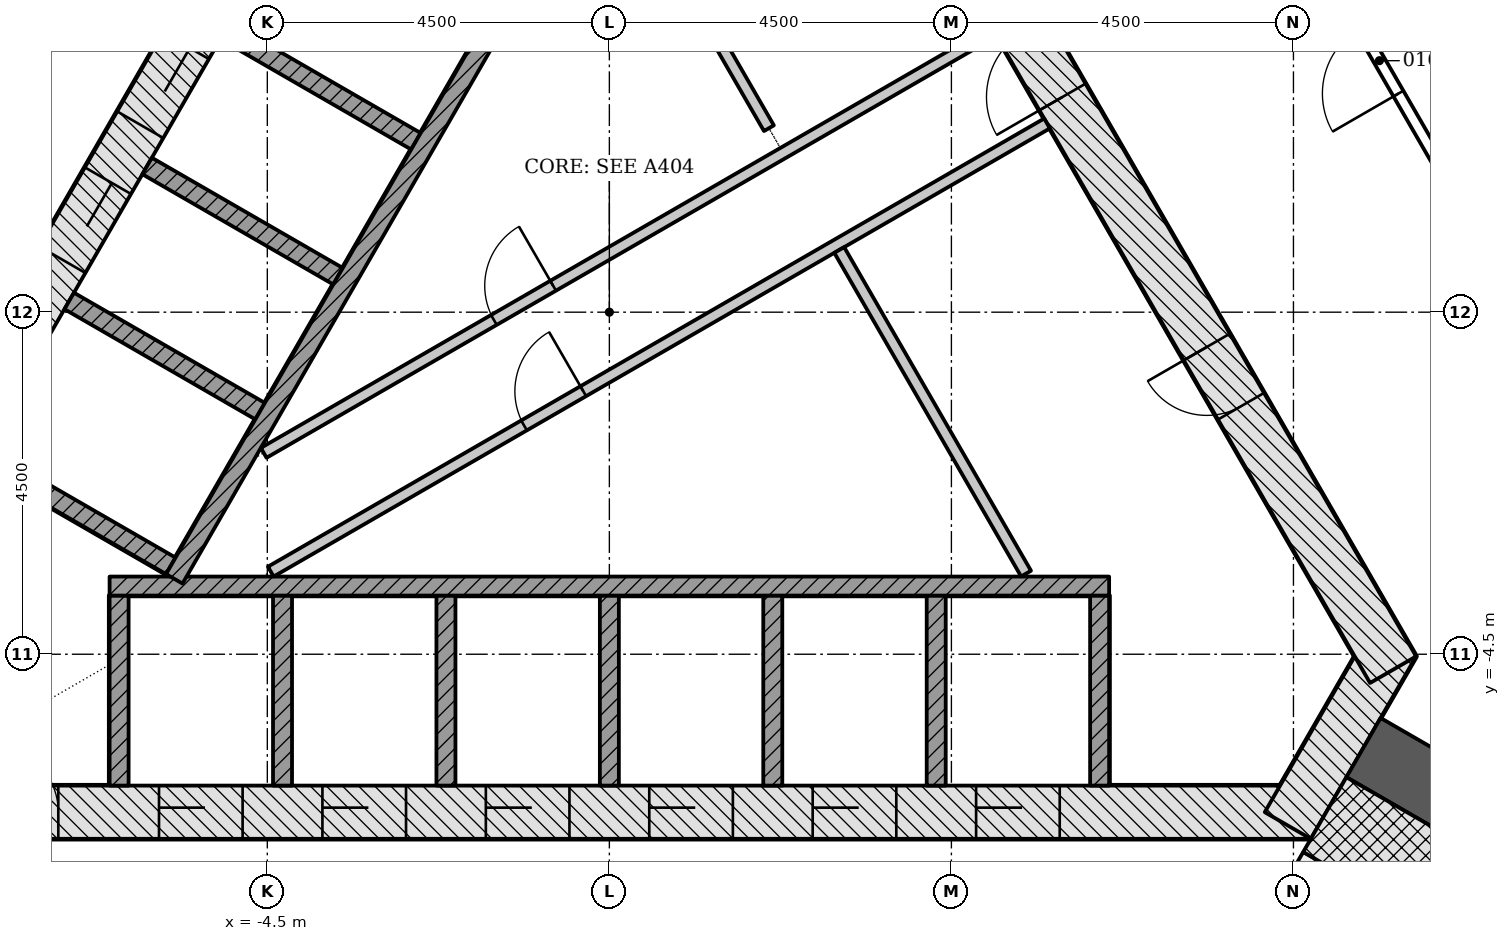
"""IFC4 building model, lengths in metres.
Left out: names, types, materials, properties, quantities, classifications, styles, units other than length and angle.
Written with IfcOpenShell. Run it as: python <this file> out.ifc"""

import sys

from ifc_helpers import new_model, si_unit, direction, frame, frame_2d, origin, place, context, subcontext, project, spatial, rectangle, extrude, element, fill, save


model = new_model("IFC4")
c1 = context("Model", 3, precision=1e-05, world=origin(), true_north=direction((0.0, 1.0)))
c2 = subcontext(c1, "Body", "Model", "MODEL_VIEW")
j1 = project(units=[si_unit("LENGTHUNIT", "METRE"), si_unit("PLANEANGLEUNIT", "RADIAN")], contexts=[c1])
p1 = place(None, origin())
s1 = spatial("IfcSite", under=j1, at=p1, CompositionType="ELEMENT")
p2 = place(p1, origin())
s2 = spatial("IfcBuilding", under=s1, at=p2, CompositionType="ELEMENT")
p3 = place(p2, frame((0.0, 0.0, 19.5)))
s3 = spatial("IfcBuildingStorey", under=s2, at=p3, CompositionType="ELEMENT", Elevation=19.5)
p4 = place(p3, frame((-9.229, -6.578, -0.25), z_axis=(0.0, 0.0, 1.0), x_axis=(1.0, 0.0, 0.0)))
e1 = element("IfcWall", 1, at=p4, inside=s3, PredefinedType="SHEAR", context=c2, shape_type="SweptSolid", body=[
    extrude(rectangle(XDim=18.458, YDim=0.7, at=frame_2d((9.229, 0.0))), origin(), (0.0, 0.0, 1.0), 4.55),
])
p5 = place(p4, frame((3.304, 0.0, 0.25)))
e2 = element("IfcOpeningElement", 2, at=p5, cuts=e1, PredefinedType="OPENING", context=c2, shape_type="SweptSolid", body=[
    extrude(rectangle(XDim=1.1, YDim=2.1, at=frame_2d((0.55, 1.05))), frame((0.0, 0.36, 0.0), z_axis=(0.0, -1.0, 0.0), x_axis=(1.0, 0.0, 0.0)), (0.0, 0.0, 1.0), 0.72),
])
p6 = place(p4, frame((5.454, 0.0, 0.25)))
e3 = element("IfcOpeningElement", 3, at=p6, cuts=e1, PredefinedType="OPENING", context=c2, shape_type="SweptSolid", body=[
    extrude(rectangle(XDim=1.1, YDim=2.1, at=frame_2d((0.55, 1.05))), frame((0.0, 0.36, 0.0), z_axis=(0.0, -1.0, 0.0), x_axis=(1.0, 0.0, 0.0)), (0.0, 0.0, 1.0), 0.72),
])
p7 = place(p4, frame((7.604, 0.0, 0.25)))
e4 = element("IfcOpeningElement", 4, at=p7, cuts=e1, PredefinedType="OPENING", context=c2, shape_type="SweptSolid", body=[
    extrude(rectangle(XDim=1.1, YDim=2.1, at=frame_2d((0.55, 1.05))), frame((0.0, 0.36, 0.0), z_axis=(0.0, -1.0, 0.0), x_axis=(1.0, 0.0, 0.0)), (0.0, 0.0, 1.0), 0.72),
])
p8 = place(p4, frame((9.754, 0.0, 0.25)))
e5 = element("IfcOpeningElement", 5, at=p8, cuts=e1, PredefinedType="OPENING", context=c2, shape_type="SweptSolid", body=[
    extrude(rectangle(XDim=1.1, YDim=2.1, at=frame_2d((0.55, 1.05))), frame((0.0, 0.36, 0.0), z_axis=(0.0, -1.0, 0.0), x_axis=(1.0, 0.0, 0.0)), (0.0, 0.0, 1.0), 0.72),
])
p9 = place(p4, frame((11.904, 0.0, 0.25)))
e6 = element("IfcOpeningElement", 6, at=p9, cuts=e1, PredefinedType="OPENING", context=c2, shape_type="SweptSolid", body=[
    extrude(rectangle(XDim=1.1, YDim=2.1, at=frame_2d((0.55, 1.05))), frame((0.0, 0.36, 0.0), z_axis=(0.0, -1.0, 0.0), x_axis=(1.0, 0.0, 0.0)), (0.0, 0.0, 1.0), 0.72),
])
p10 = place(p4, frame((14.054, 0.0, 0.25)))
e7 = element("IfcOpeningElement", 7, at=p10, cuts=e1, PredefinedType="OPENING", context=c2, shape_type="SweptSolid", body=[
    extrude(rectangle(XDim=1.1, YDim=2.1, at=frame_2d((0.55, 1.05))), frame((0.0, 0.36, 0.0), z_axis=(0.0, -1.0, 0.0), x_axis=(1.0, 0.0, 0.0)), (0.0, 0.0, 1.0), 0.72),
])
p11 = place(p4, frame((1.079, 0.0, 0.25)))
e8 = element("IfcOpeningElement", 8, at=p11, cuts=e1, PredefinedType="OPENING", context=c2, shape_type="SweptSolid", body=[
    extrude(rectangle(XDim=0.9, YDim=2.1, at=frame_2d((0.45, 1.05))), frame((0.0, 0.36, 0.0), z_axis=(0.0, -1.0, 0.0), x_axis=(1.0, 0.0, 0.0)), (0.0, 0.0, 1.0), 0.72),
])
p12 = place(p3, frame((8.926, -6.753, -0.25), z_axis=(0.0, 0.0, 1.0), x_axis=(0.500042739161, 0.866000726912, 0.0)))
e9 = element("IfcWall", 9, at=p12, inside=s3, PredefinedType="SHEAR", context=c2, shape_type="SweptSolid", body=[
    extrude(rectangle(XDim=2.771, YDim=0.7, at=frame_2d((1.386, 0.0))), origin(), (0.0, 0.0, 1.0), 4.55),
])
p13 = place(p3, frame((10.311, -4.703, -0.25), z_axis=(0.0, 0.0, 1.0), x_axis=(-0.500001446645, 0.866024568562, 0.0)))
e10 = element("IfcWall", 10, at=p13, inside=s3, PredefinedType="SHEAR", context=c2, shape_type="SweptSolid", body=[
    extrude(rectangle(XDim=18.458, YDim=0.7, at=frame_2d((9.229, 0.0))), origin(), (0.0, 0.0, 1.0), 4.55),
])
p14 = place(p13, frame((8.7, 0.0, 0.25)))
e11 = element("IfcOpeningElement", 11, at=p14, cuts=e10, PredefinedType="OPENING", context=c2, shape_type="SweptSolid", body=[
    extrude(rectangle(XDim=1.0, YDim=2.1, at=frame_2d((0.5, 1.05))), frame((0.0, 0.36, 0.0), z_axis=(0.0, -1.0, 0.0), x_axis=(1.0, 0.0, 0.0)), (0.0, 0.0, 1.0), 0.72),
])
p15 = place(p13, frame((4.002, 0.0, 0.25)))
e12 = element("IfcOpeningElement", 12, at=p15, cuts=e10, PredefinedType="OPENING", context=c2, shape_type="SweptSolid", body=[
    extrude(rectangle(XDim=0.9, YDim=2.1, at=frame_2d((0.45, 1.05))), frame((0.0, 0.36, 0.0), z_axis=(0.0, -1.0, 0.0), x_axis=(1.0, 0.0, 0.0)), (0.0, 0.0, 1.0), 0.72),
])
p16 = place(p13, frame((14.093, 0.0, 0.25)))
e13 = element("IfcOpeningElement", 13, at=p16, cuts=e10, PredefinedType="OPENING", context=c2, shape_type="SweptSolid", body=[
    extrude(rectangle(XDim=0.9, YDim=2.1, at=frame_2d((0.45, 1.05))), frame((0.0, 0.36, 0.0), z_axis=(0.0, -1.0, 0.0), x_axis=(1.0, 0.0, 0.0)), (0.0, 0.0, 1.0), 0.72),
])
p17 = place(p3, frame((-1.083, 11.281, -0.25), z_axis=(0.0, 0.0, 1.0), x_axis=(-0.500001446645, -0.866024568562, 0.0)))
e14 = element("IfcWall", 14, at=p17, inside=s3, PredefinedType="SHEAR", context=c2, shape_type="SweptSolid", body=[
    extrude(rectangle(XDim=18.458, YDim=0.7, at=frame_2d((9.229, 0.0))), origin(), (0.0, 0.0, 1.0), 4.55),
])
p18 = place(p17, frame((8.979, 0.0, 0.25)))
e15 = element("IfcOpeningElement", 15, at=p18, cuts=e14, PredefinedType="OPENING", context=c2, shape_type="SweptSolid", body=[
    extrude(rectangle(XDim=1.2, YDim=2.1, at=frame_2d((0.6, 1.05))), frame((0.0, 0.36, 0.0), z_axis=(0.0, -1.0, 0.0), x_axis=(1.0, 0.0, 0.0)), (0.0, 0.0, 1.0), 0.72),
])
p19 = place(p17, frame((11.029, 0.0, 0.25)))
e16 = element("IfcOpeningElement", 16, at=p19, cuts=e14, PredefinedType="OPENING", context=c2, shape_type="SweptSolid", body=[
    extrude(rectangle(XDim=1.2, YDim=2.1, at=frame_2d((0.6, 1.05))), frame((0.0, 0.36, 0.0), z_axis=(0.0, -1.0, 0.0), x_axis=(1.0, 0.0, 0.0)), (0.0, 0.0, 1.0), 0.72),
])
p20 = place(p3, frame((9.922, -5.728, -0.25), z_axis=(0.0, 0.0, 1.0), x_axis=(0.866028046028, -0.499995423472, 0.0)))
e17 = element("IfcWall", 17, at=p20, inside=s3, PredefinedType="SHEAR", context=c2, shape_type="SweptSolid", body=[
    extrude(rectangle(XDim=14.633, YDim=0.9, at=frame_2d((7.316, 0.0))), origin(), (0.0, 0.0, 1.0), 4.55),
])
p21 = place(p20, frame((7.35, 0.0, 0.25)))
e18 = element("IfcOpeningElement", 18, at=p21, cuts=e17, PredefinedType="OPENING", context=c2, shape_type="SweptSolid", body=[
    extrude(rectangle(XDim=1.5, YDim=2.1, at=frame_2d((0.75, 1.05))), frame((0.0, 0.46, 0.0), z_axis=(0.0, -1.0, 0.0), x_axis=(1.0, 0.0, 0.0)), (0.0, 0.0, 1.0), 0.92),
])
for number, where, z_axis, x_axis in (
    (19, (-6.45, -6.228, -0.25), (0.0, 0.0, 1.0), (0.0, 1.0, 0.0)),
    (20, (-4.3, -6.228, -0.25), (0.0, 0.0, 1.0), (0.0, 1.0, 0.0)),
    (21, (-2.15, -6.228, -0.25), (0.0, 0.0, 1.0), (0.0, 1.0, 0.0)),
    (22, (0.0, -6.228, -0.25), (0.0, 0.0, 1.0), (0.0, 1.0, 0.0)),
    (23, (2.15, -6.228, -0.25), (0.0, 0.0, 1.0), (0.0, 1.0, 0.0)),
    (24, (4.3, -6.228, -0.25), (0.0, 0.0, 1.0), (0.0, 1.0, 0.0)),
    (25, (6.45, -6.228, -0.25), (0.0, 0.0, 1.0), (0.0, 1.0, 0.0)),
):
    element("IfcWall", number, at=place(p3, frame(where, z_axis=z_axis, x_axis=x_axis)), inside=s3, PredefinedType="PARTITIONING", context=c2, shape_type="SweptSolid", body=[
        extrude(rectangle(XDim=2.5, YDim=0.25, at=frame_2d((1.25, 0.0))), origin(), (0.0, 0.0, 1.0), 4.55),
    ])
p22 = place(p3, frame((-6.575, -3.603, 0.0), z_axis=(0.0, 0.0, 1.0), x_axis=(1.0, 0.0, 0.0)))
e26 = element("IfcWall", 26, at=p22, inside=s3, PredefinedType="PARTITIONING", context=c2, shape_type="SweptSolid", body=[
    extrude(rectangle(XDim=13.15, YDim=0.25, at=frame_2d((6.575, 0.0))), origin(), (0.0, 0.0, 1.0), 4.3),
])
for number, where, z_axis, x_axis in (
    (27, (-5.056, 3.699, -0.25), (0.0, 0.0, 1.0), (0.866, -0.5, 0.0)),
    (28, (-6.081, 1.923, -0.25), (0.0, 0.0, 1.0), (0.866, -0.5, 0.0)),
    (29, (-7.106, 0.148, -0.25), (0.0, 0.0, 1.0), (0.866, -0.5, 0.0)),
    (30, (-8.281, -1.887, -0.25), (0.0, 0.0, 1.0), (0.866, -0.5, 0.0)),
):
    element("IfcWall", number, at=place(p3, frame(where, z_axis=z_axis, x_axis=x_axis)), inside=s3, PredefinedType="PARTITIONING", context=c2, shape_type="SweptSolid", body=[
        extrude(rectangle(XDim=2.9, YDim=0.25, at=frame_2d((1.45, 0.0))), origin(), (0.0, 0.0, 1.0), 4.55),
    ])
p23 = place(p3, frame((0.176, 6.711, 0.0), z_axis=(0.0, 0.0, 1.0), x_axis=(-0.500004227369, -0.866022963098, 0.0)))
e31 = element("IfcWall", 31, at=p23, inside=s3, PredefinedType="PARTITIONING", context=c2, shape_type="SweptSolid", body=[
    extrude(rectangle(XDim=11.8, YDim=0.25, at=frame_2d((5.9, 0.0))), origin(), (0.0, 0.0, 1.0), 4.3),
])
p24 = place(p3, frame((-4.548, -1.851, 0.0), z_axis=(0.0, 0.0, 1.0), x_axis=(0.866023939251, 0.500002536638, 0.0)))
e32 = element("IfcWall", 32, at=p24, inside=s3, PredefinedType="PARTITIONING", context=c2, shape_type="SweptSolid", body=[
    extrude(rectangle(XDim=11.092, YDim=0.15, at=frame_2d((5.546, 0.0))), origin(), (0.0, 0.0, 1.0), 4.3),
])
p25 = place(p24, frame((3.497, 0.0, 0.0)))
e33 = element("IfcOpeningElement", 33, at=p25, cuts=e32, PredefinedType="OPENING", context=c2, shape_type="SweptSolid", body=[
    extrude(rectangle(XDim=0.9, YDim=2.1, at=frame_2d((0.45, 1.05))), frame((0.0, 0.085, 0.0), z_axis=(0.0, -1.0, 0.0), x_axis=(1.0, 0.0, 0.0)), (0.0, 0.0, 1.0), 0.17),
])
p26 = place(p3, frame((2.099, 2.42, 0.0), z_axis=(0.0, 0.0, 1.0), x_axis=(-0.499998449073, 0.866026299211, 0.0)))
e34 = element("IfcWall", 34, at=p26, inside=s3, PredefinedType="PARTITIONING", context=c2, shape_type="SweptSolid", body=[
    extrude(rectangle(XDim=4.211, YDim=0.15, at=frame_2d((2.106, 0.0))), origin(), (0.0, 0.0, 1.0), 4.3),
])
p27 = place(p3, frame((-4.454, -3.413, 0.0), z_axis=(0.0, 0.0, 1.0), x_axis=(0.86603043987, 0.499991277142, 0.0)))
e35 = element("IfcWall", 35, at=p27, inside=s3, PredefinedType="PARTITIONING", context=c2, shape_type="SweptSolid", body=[
    extrude(rectangle(XDim=11.792, YDim=0.15, at=frame_2d((5.896, 0.0))), origin(), (0.0, 0.0, 1.0), 4.3),
])
p28 = place(p27, frame((3.847, 0.0, 0.0)))
e36 = element("IfcOpeningElement", 36, at=p28, cuts=e35, PredefinedType="OPENING", context=c2, shape_type="SweptSolid", body=[
    extrude(rectangle(XDim=0.9, YDim=2.1, at=frame_2d((0.45, 1.05))), frame((0.0, 0.085, 0.0), z_axis=(0.0, -1.0, 0.0), x_axis=(1.0, 0.0, 0.0)), (0.0, 0.0, 1.0), 0.17),
])
p29 = place(p3, frame((5.482, -3.439, 0.0), z_axis=(0.0, 0.0, 1.0), x_axis=(-0.500006183238, 0.866021833861, 0.0)))
e37 = element("IfcWall", 37, at=p29, inside=s3, PredefinedType="PARTITIONING", context=c2, shape_type="SweptSolid", body=[
    extrude(rectangle(XDim=4.916, YDim=0.15, at=frame_2d((2.458, 0.0))), origin(), (0.0, 0.0, 1.0), 4.3),
])
p30 = place(p3, frame((7.44, -10.226, -0.25), z_axis=(0.0, 0.0, 1.0), x_axis=(0.500022077904, 0.866012656725, 0.0)))
e38 = element("IfcWall", 38, at=p30, inside=s3, PredefinedType="SHEAR", context=c2, shape_type="SweptSolid", body=[
    extrude(rectangle(XDim=3.55, YDim=0.2, at=frame_2d((1.775, 0.0))), origin(), (0.0, 0.0, 1.0), 4.55),
])
p31 = place(p30, frame((1.175, 0.0, 0.25)))
e39 = element("IfcOpeningElement", 39, at=p31, cuts=e38, PredefinedType="OPENING", context=c2, shape_type="SweptSolid", body=[
    extrude(rectangle(XDim=1.2, YDim=2.1, at=frame_2d((0.6, 1.05))), frame((0.0, 0.11, 0.0), z_axis=(0.0, -1.0, 0.0), x_axis=(1.0, 0.0, 0.0)), (0.0, 0.0, 1.0), 0.22),
])
p32 = place(p3, frame((9.413, -6.61, -0.25), z_axis=(0.0, 0.0, 1.0), x_axis=(0.866018442252, -0.500012057535, 0.0)))
e40 = element("IfcWall", 40, at=p32, inside=s3, PredefinedType="SHEAR", context=c2, shape_type="SweptSolid", body=[
    extrude(rectangle(XDim=7.2, YDim=1.136, at=frame_2d((3.6, 0.0))), origin(), (0.0, 0.0, 1.0), 4.55),
])
p33 = place(p3, frame((11.206, 1.447, 0.0), z_axis=(0.0, 0.0, 1.0), x_axis=(-0.50014197282, 0.865943420221, 0.0)))
e41 = element("IfcWall", 41, at=p33, inside=s3, PredefinedType="PARTITIONING", context=c2, shape_type="SweptSolid", body=[
    extrude(rectangle(XDim=4.349, YDim=0.15, at=frame_2d((2.174, 0.0))), origin(), (0.0, 0.0, 1.0), 3.688),
])
p34 = place(p33, frame((1.65, 0.0, 0.0)))
e42 = element("IfcOpeningElement", 42, at=p34, cuts=e41, PredefinedType="OPENING", context=c2, shape_type="SweptSolid", body=[
    extrude(rectangle(XDim=1.0, YDim=2.1, at=frame_2d((0.5, 1.05))), frame((0.0, 0.085, 0.0), z_axis=(0.0, -1.0, 0.0), x_axis=(1.0, 0.0, 0.0)), (0.0, 0.0, 1.0), 0.17),
])
p35 = place(p5, origin())
e43 = element("IfcDoor", 43, at=p35, inside=s3, OperationType="DOUBLE_DOOR_SLIDING", PredefinedType="DOOR", context=c2, shape_type="SweptSolid", body=[
    extrude(rectangle(XDim=1.1, YDim=2.1, at=frame_2d((0.55, 1.05))), frame((0.0, 0.025, 0.0), z_axis=(0.0, -1.0, 0.0), x_axis=(1.0, 0.0, 0.0)), (0.0, 0.0, 1.0), 0.05),
])
fill(e2, e43)
p36 = place(p6, origin())
e44 = element("IfcDoor", 44, at=p36, inside=s3, OperationType="DOUBLE_DOOR_SLIDING", PredefinedType="DOOR", context=c2, shape_type="SweptSolid", body=[
    extrude(rectangle(XDim=1.1, YDim=2.1, at=frame_2d((0.55, 1.05))), frame((0.0, 0.025, 0.0), z_axis=(0.0, -1.0, 0.0), x_axis=(1.0, 0.0, 0.0)), (0.0, 0.0, 1.0), 0.05),
])
fill(e3, e44)
p37 = place(p7, origin())
e45 = element("IfcDoor", 45, at=p37, inside=s3, OperationType="DOUBLE_DOOR_SLIDING", PredefinedType="DOOR", context=c2, shape_type="SweptSolid", body=[
    extrude(rectangle(XDim=1.1, YDim=2.1, at=frame_2d((0.55, 1.05))), frame((0.0, 0.025, 0.0), z_axis=(0.0, -1.0, 0.0), x_axis=(1.0, 0.0, 0.0)), (0.0, 0.0, 1.0), 0.05),
])
fill(e4, e45)
p38 = place(p8, origin())
e46 = element("IfcDoor", 46, at=p38, inside=s3, OperationType="DOUBLE_DOOR_SLIDING", PredefinedType="DOOR", context=c2, shape_type="SweptSolid", body=[
    extrude(rectangle(XDim=1.1, YDim=2.1, at=frame_2d((0.55, 1.05))), frame((0.0, 0.025, 0.0), z_axis=(0.0, -1.0, 0.0), x_axis=(1.0, 0.0, 0.0)), (0.0, 0.0, 1.0), 0.05),
])
fill(e5, e46)
p39 = place(p9, origin())
e47 = element("IfcDoor", 47, at=p39, inside=s3, OperationType="DOUBLE_DOOR_SLIDING", PredefinedType="DOOR", context=c2, shape_type="SweptSolid", body=[
    extrude(rectangle(XDim=1.1, YDim=2.1, at=frame_2d((0.55, 1.05))), frame((0.0, 0.025, 0.0), z_axis=(0.0, -1.0, 0.0), x_axis=(1.0, 0.0, 0.0)), (0.0, 0.0, 1.0), 0.05),
])
fill(e6, e47)
p40 = place(p10, origin())
e48 = element("IfcDoor", 48, at=p40, inside=s3, OperationType="DOUBLE_DOOR_SLIDING", PredefinedType="DOOR", context=c2, shape_type="SweptSolid", body=[
    extrude(rectangle(XDim=1.1, YDim=2.1, at=frame_2d((0.55, 1.05))), frame((0.0, 0.025, 0.0), z_axis=(0.0, -1.0, 0.0), x_axis=(1.0, 0.0, 0.0)), (0.0, 0.0, 1.0), 0.05),
])
fill(e7, e48)
p41 = place(p18, origin())
e49 = element("IfcDoor", 49, at=p41, inside=s3, OperationType="DOUBLE_DOOR_SLIDING", PredefinedType="DOOR", context=c2, shape_type="SweptSolid", body=[
    extrude(rectangle(XDim=1.2, YDim=2.1, at=frame_2d((0.6, 1.05))), frame((0.0, 0.025, 0.0), z_axis=(0.0, -1.0, 0.0), x_axis=(1.0, 0.0, 0.0)), (0.0, 0.0, 1.0), 0.05),
])
fill(e15, e49)
p42 = place(p19, origin())
e50 = element("IfcDoor", 50, at=p42, inside=s3, OperationType="DOUBLE_DOOR_SLIDING", PredefinedType="DOOR", context=c2, shape_type="SweptSolid", body=[
    extrude(rectangle(XDim=1.2, YDim=2.1, at=frame_2d((0.6, 1.05))), frame((0.0, 0.025, 0.0), z_axis=(0.0, -1.0, 0.0), x_axis=(1.0, 0.0, 0.0)), (0.0, 0.0, 1.0), 0.05),
])
fill(e16, e50)
p43 = place(p14, origin())
e51 = element("IfcDoor", 51, at=p43, inside=s3, OperationType="SINGLE_SWING_LEFT", PredefinedType="DOOR", context=c2, shape_type="SweptSolid", body=[
    extrude(rectangle(XDim=1.0, YDim=2.1, at=frame_2d((0.5, 1.05))), frame((0.0, 0.075, 0.0), z_axis=(0.0, -1.0, 0.0), x_axis=(1.0, 0.0, 0.0)), (0.0, 0.0, 1.0), 0.15),
])
fill(e11, e51)
p44 = place(p15, origin())
e52 = element("IfcDoor", 52, at=p44, inside=s3, OperationType="SINGLE_SWING_RIGHT", PredefinedType="DOOR", context=c2, shape_type="SweptSolid", body=[
    extrude(rectangle(XDim=0.9, YDim=2.1, at=frame_2d((0.45, 1.05))), frame((0.0, 0.075, 0.0), z_axis=(0.0, -1.0, 0.0), x_axis=(1.0, 0.0, 0.0)), (0.0, 0.0, 1.0), 0.15),
])
fill(e12, e52)
p45 = place(p28, origin())
e53 = element("IfcDoor", 53, at=p45, inside=s3, OperationType="SINGLE_SWING_RIGHT", PredefinedType="DOOR", context=c2, shape_type="SweptSolid", body=[
    extrude(rectangle(XDim=0.9, YDim=2.1, at=frame_2d((0.45, 1.05))), frame((0.0, 0.025, 0.0), z_axis=(0.0, -1.0, 0.0), x_axis=(1.0, 0.0, 0.0)), (0.0, 0.0, 1.0), 0.05),
])
fill(e36, e53)
p46 = place(p11, origin())
e54 = element("IfcDoor", 54, at=p46, inside=s3, OperationType="SINGLE_SWING_LEFT", PredefinedType="DOOR", context=c2, shape_type="SweptSolid", body=[
    extrude(rectangle(XDim=0.9, YDim=2.1, at=frame_2d((0.45, 1.05))), frame((0.0, 0.075, 0.0), z_axis=(0.0, -1.0, 0.0), x_axis=(1.0, 0.0, 0.0)), (0.0, 0.0, 1.0), 0.15),
])
fill(e8, e54)
p47 = place(p25, origin())
e55 = element("IfcDoor", 55, at=p47, inside=s3, OperationType="SINGLE_SWING_RIGHT", PredefinedType="DOOR", context=c2, shape_type="SweptSolid", body=[
    extrude(rectangle(XDim=0.9, YDim=2.1, at=frame_2d((0.45, 1.05))), frame((0.0, 0.025, 0.0), z_axis=(0.0, -1.0, 0.0), x_axis=(1.0, 0.0, 0.0)), (0.0, 0.0, 1.0), 0.05),
])
fill(e33, e55)
p48 = place(p34, origin())
e56 = element("IfcDoor", 56, at=p48, inside=s3, OperationType="SINGLE_SWING_RIGHT", PredefinedType="DOOR", context=c2, shape_type="SweptSolid", body=[
    extrude(rectangle(XDim=1.0, YDim=2.1, at=frame_2d((0.5, 1.05))), frame((0.0, 0.025, 0.0), z_axis=(0.0, -1.0, 0.0), x_axis=(1.0, 0.0, 0.0)), (0.0, 0.0, 1.0), 0.05),
])
fill(e42, e56)
save(model, sys.argv[1])
